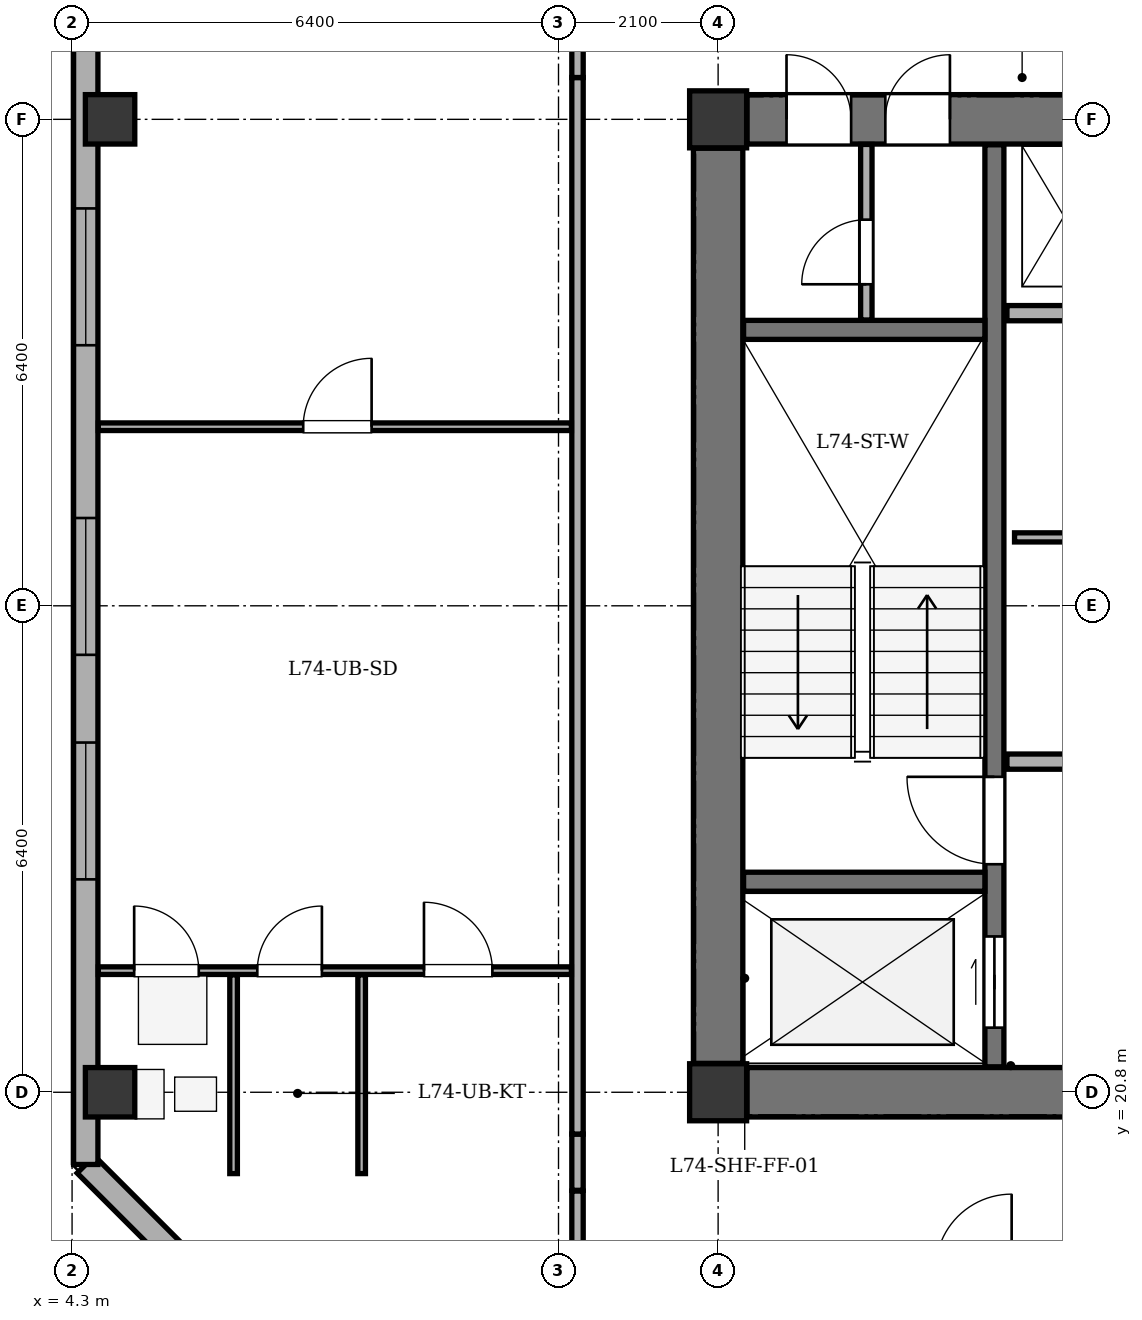
"""IFC4 building model, lengths in metres.
Left out: names, types, materials, properties, quantities, classifications, styles, units other than length and angle.
Written with IfcOpenShell. Run it as: python <this file> out.ifc"""

import sys

from ifc_helpers import new_model, si_unit, direction, frame, frame_2d, origin, origin_2d, place, context, subcontext, project, spatial, rectangle, extrude, element, fill, save


model = new_model("IFC4")
c1 = context("Model", 3, precision=1e-05, world=origin(), true_north=direction((0.0, 1.0)))
c2 = subcontext(c1, "Body", "Model", "MODEL_VIEW")
j1 = project(units=[si_unit("LENGTHUNIT", "METRE"), si_unit("PLANEANGLEUNIT", "RADIAN")], contexts=[c1])
p1 = place(None, origin())
s1 = spatial("IfcSite", under=j1, at=p1, CompositionType="ELEMENT")
p2 = place(p1, origin())
s2 = spatial("IfcBuilding", under=s1, at=p2, CompositionType="ELEMENT")
p3 = place(p2, frame((0.0, 0.0, 278.9)))
s3 = spatial("IfcBuildingStorey", under=s2, at=p3, CompositionType="ELEMENT", Elevation=278.9)
for number, where, z_axis, x_axis in (
    (1, (12.8, 20.8, 0.0), (0.0, 0.0, 1.0), (1.0, 0.0, 0.0)),
    (2, (12.8, 33.6, 0.0), (0.0, 0.0, 1.0), (1.0, 0.0, 0.0)),
):
    element("IfcColumn", number, at=place(p3, frame(where, z_axis=z_axis, x_axis=x_axis)), inside=s3, PredefinedType="COLUMN", context=c2, shape_type="SweptSolid", body=[
        extrude(rectangle(XDim=0.75, YDim=0.75, at=origin_2d()), origin(), (0.0, 0.0, 1.0), 3.4),
    ])
for number, where, z_axis, x_axis in (
    (3, (4.8, 20.8, 0.0), (0.0, 0.0, 1.0), (1.0, 0.0, 0.0)),
    (4, (4.8, 33.6, 0.0), (0.0, 0.0, 1.0), (1.0, 0.0, 0.0)),
):
    element("IfcColumn", number, at=place(p3, frame(where, z_axis=z_axis, x_axis=x_axis)), inside=s3, PredefinedType="COLUMN", context=c2, shape_type="SweptSolid", body=[
        extrude(rectangle(XDim=0.65, YDim=0.65, at=origin_2d()), origin(), (0.0, 0.0, 1.0), 3.4),
    ])
p4 = place(p3, frame((8.3, 16.03, 0.0), z_axis=(0.0, 0.0, 1.0), x_axis=(-0.707106781187, 0.707106781187, 0.0)))
e5 = element("IfcWall", 5, at=p4, inside=s3, PredefinedType="STANDARD", context=c2, shape_type="SweptSolid", body=[
    extrude(rectangle(XDim=5.402, YDim=0.32, at=frame_2d((2.701, 0.0))), origin(), (0.0, 0.0, 1.0), 2.575),
])
p5 = place(p4, frame((2.001, 0.0, 0.75)))
e6 = element("IfcOpeningElement", 6, at=p5, cuts=e5, PredefinedType="OPENING", context=c2, shape_type="SweptSolid", body=[
    extrude(rectangle(XDim=1.4, YDim=1.65, at=frame_2d((0.7, 0.825))), frame((0.0, 0.17, 0.0), z_axis=(0.0, -1.0, 0.0), x_axis=(1.0, 0.0, 0.0)), (0.0, 0.0, 1.0), 0.34),
])
p6 = place(p3, frame((4.48, 19.85, 0.0), z_axis=(0.0, 0.0, 1.0), x_axis=(0.0, 1.0, 0.0)))
e7 = element("IfcWall", 7, at=p6, inside=s3, PredefinedType="STANDARD", context=c2, shape_type="SweptSolid", body=[
    extrude(rectangle(XDim=21.25, YDim=0.32, at=frame_2d((10.625, 0.0))), origin(), (0.0, 0.0, 1.0), 2.575),
])
p7 = place(p6, frame((3.751, 0.0, 0.75)))
e8 = element("IfcOpeningElement", 8, at=p7, cuts=e7, PredefinedType="OPENING", context=c2, shape_type="SweptSolid", body=[
    extrude(rectangle(XDim=1.8, YDim=1.7, at=frame_2d((0.9, 0.85))), frame((0.0, 0.17, 0.0), z_axis=(0.0, -1.0, 0.0), x_axis=(1.0, 0.0, 0.0)), (0.0, 0.0, 1.0), 0.34),
])
p8 = place(p6, frame((6.705, 0.0, 0.75)))
e9 = element("IfcOpeningElement", 9, at=p8, cuts=e7, PredefinedType="OPENING", context=c2, shape_type="SweptSolid", body=[
    extrude(rectangle(XDim=1.8, YDim=1.7, at=frame_2d((0.9, 0.85))), frame((0.0, 0.17, 0.0), z_axis=(0.0, -1.0, 0.0), x_axis=(1.0, 0.0, 0.0)), (0.0, 0.0, 1.0), 0.34),
])
p9 = place(p6, frame((10.778, 0.0, 0.75)))
e10 = element("IfcOpeningElement", 10, at=p9, cuts=e7, PredefinedType="OPENING", context=c2, shape_type="SweptSolid", body=[
    extrude(rectangle(XDim=1.8, YDim=1.7, at=frame_2d((0.9, 0.85))), frame((0.0, 0.17, 0.0), z_axis=(0.0, -1.0, 0.0), x_axis=(1.0, 0.0, 0.0)), (0.0, 0.0, 1.0), 0.34),
])
p10 = place(p6, frame((15.062, 0.0, 0.75)))
e11 = element("IfcOpeningElement", 11, at=p10, cuts=e7, PredefinedType="OPENING", context=c2, shape_type="SweptSolid", body=[
    extrude(rectangle(XDim=1.8, YDim=1.7, at=frame_2d((0.9, 0.85))), frame((0.0, 0.17, 0.0), z_axis=(0.0, -1.0, 0.0), x_axis=(1.0, 0.0, 0.0)), (0.0, 0.0, 1.0), 0.34),
])
p11 = place(p6, frame((18.038, 0.0, 0.75)))
e12 = element("IfcOpeningElement", 12, at=p11, cuts=e7, PredefinedType="OPENING", context=c2, shape_type="SweptSolid", body=[
    extrude(rectangle(XDim=1.8, YDim=1.7, at=frame_2d((0.9, 0.85))), frame((0.0, 0.17, 0.0), z_axis=(0.0, -1.0, 0.0), x_axis=(1.0, 0.0, 0.0)), (0.0, 0.0, 1.0), 0.34),
])
p12 = place(p3, frame((12.8, 21.18, 0.0), z_axis=(0.0, 0.0, 1.0), x_axis=(0.0, 1.0, 0.0)))
e13 = element("IfcWall", 13, at=p12, inside=s3, PredefinedType="SHEAR", context=c2, shape_type="SweptSolid", body=[
    extrude(rectangle(XDim=12.04, YDim=0.65, at=frame_2d((6.02, 0.0))), origin(), (0.0, 0.0, 1.0), 2.95),
])
p13 = place(p3, frame((13.18, 20.8, 0.0), z_axis=(0.0, 0.0, 1.0), x_axis=(1.0, 0.0, 0.0)))
e14 = element("IfcWall", 14, at=p13, inside=s3, PredefinedType="SHEAR", context=c2, shape_type="SweptSolid", body=[
    extrude(rectangle(XDim=7.24, YDim=0.65, at=frame_2d((3.62, 0.0))), origin(), (0.0, 0.0, 1.0), 2.95),
])
p14 = place(p3, frame((13.18, 33.6, 0.0), z_axis=(0.0, 0.0, 1.0), x_axis=(1.0, 0.0, 0.0)))
e15 = element("IfcWall", 15, at=p14, inside=s3, PredefinedType="SHEAR", context=c2, shape_type="SweptSolid", body=[
    extrude(rectangle(XDim=7.24, YDim=0.65, at=frame_2d((3.62, 0.0))), origin(), (0.0, 0.0, 1.0), 2.95),
])
p15 = place(p14, frame((0.52, 0.0, 0.0)))
e16 = element("IfcOpeningElement", 16, at=p15, cuts=e15, PredefinedType="OPENING", context=c2, shape_type="SweptSolid", body=[
    extrude(rectangle(XDim=0.85, YDim=2.02, at=frame_2d((0.425, 1.01))), frame((0.0, 0.335, 0.0), z_axis=(0.0, -1.0, 0.0), x_axis=(1.0, 0.0, 0.0)), (0.0, 0.0, 1.0), 0.67),
])
p16 = place(p14, frame((1.82, 0.0, 0.0)))
e17 = element("IfcOpeningElement", 17, at=p16, cuts=e15, PredefinedType="OPENING", context=c2, shape_type="SweptSolid", body=[
    extrude(rectangle(XDim=0.85, YDim=2.02, at=frame_2d((0.425, 1.01))), frame((0.0, 0.335, 0.0), z_axis=(0.0, -1.0, 0.0), x_axis=(1.0, 0.0, 0.0)), (0.0, 0.0, 1.0), 0.67),
])
p17 = place(p3, frame((16.435, 21.135, 0.0), z_axis=(0.0, 0.0, 1.0), x_axis=(0.0, 1.0, 0.0)))
e18 = element("IfcWall", 18, at=p17, inside=s3, PredefinedType="SHEAR", context=c2, shape_type="SweptSolid", body=[
    extrude(rectangle(XDim=12.13, YDim=0.25, at=frame_2d((6.065, 0.0))), origin(), (0.0, 0.0, 1.0), 2.95),
])
p18 = place(p17, frame((0.515, 0.0, 0.0)))
e19 = element("IfcOpeningElement", 19, at=p18, cuts=e18, PredefinedType="OPENING", context=c2, shape_type="SweptSolid", body=[
    extrude(rectangle(XDim=1.2, YDim=2.15, at=frame_2d((0.6, 1.075))), frame((0.0, 0.135, 0.0), z_axis=(0.0, -1.0, 0.0), x_axis=(1.0, 0.0, 0.0)), (0.0, 0.0, 1.0), 0.27),
])
p19 = place(p17, frame((2.665, 0.0, 0.0)))
e20 = element("IfcOpeningElement", 20, at=p19, cuts=e18, PredefinedType="OPENING", context=c2, shape_type="SweptSolid", body=[
    extrude(rectangle(XDim=1.15, YDim=2.15, at=frame_2d((0.575, 1.075))), frame((0.0, 0.135, 0.0), z_axis=(0.0, -1.0, 0.0), x_axis=(1.0, 0.0, 0.0)), (0.0, 0.0, 1.0), 0.27),
])
for number, where, z_axis, x_axis in (
    (21, (13.135, 23.57, 0.0), (0.0, 0.0, 1.0), (1.0, 0.0, 0.0)),
    (22, (13.135, 30.83, 0.0), (0.0, 0.0, 1.0), (1.0, 0.0, 0.0)),
):
    element("IfcWall", number, at=place(p3, frame(where, z_axis=z_axis, x_axis=x_axis)), inside=s3, PredefinedType="SHEAR", context=c2, shape_type="SweptSolid", body=[
        extrude(rectangle(XDim=3.175, YDim=0.25, at=frame_2d((1.587, 0.0))), origin(), (0.0, 0.0, 1.0), 2.95),
    ])
for number, where, z_axis, x_axis in (
    (23, (16.6, 25.15, 0.0), (0.0, 0.0, 1.0), (1.0, 0.0, 0.0)),
    (24, (16.6, 31.05, 0.0), (0.0, 0.0, 1.0), (1.0, 0.0, 0.0)),
):
    element("IfcWall", number, at=place(p3, frame(where, z_axis=z_axis, x_axis=x_axis)), inside=s3, PredefinedType="SOLIDWALL", context=c2, shape_type="SweptSolid", body=[
        extrude(rectangle(XDim=3.85, YDim=0.2, at=frame_2d((1.925, 0.0))), origin(), (0.0, 0.0, 1.0), 2.95),
    ])
p20 = place(p3, frame((14.75, 30.96, 0.0), z_axis=(0.0, 0.0, 1.0), x_axis=(0.0, 1.0, 0.0)))
e25 = element("IfcWall", 25, at=p20, inside=s3, PredefinedType="PARTITIONING", context=c2, shape_type="SweptSolid", body=[
    extrude(rectangle(XDim=2.31, YDim=0.15, at=frame_2d((1.155, 0.0))), origin(), (0.0, 0.0, 1.0), 2.95),
])
p21 = place(p20, frame((0.47, 0.0, 0.0)))
e26 = element("IfcOpeningElement", 26, at=p21, cuts=e25, PredefinedType="OPENING", context=c2, shape_type="SweptSolid", body=[
    extrude(rectangle(XDim=0.85, YDim=2.02, at=frame_2d((0.425, 1.01))), frame((0.0, 0.085, 0.0), z_axis=(0.0, -1.0, 0.0), x_axis=(1.0, 0.0, 0.0)), (0.0, 0.0, 1.0), 0.17),
])
p22 = place(p3, frame((16.7, 28.1, 0.0), z_axis=(0.0, 0.0, 1.0), x_axis=(1.0, 0.0, 0.0)))
e27 = element("IfcWall", 27, at=p22, inside=s3, PredefinedType="PARTITIONING", context=c2, shape_type="SweptSolid", body=[
    extrude(rectangle(XDim=9.85, YDim=0.12, at=frame_2d((4.925, 0.0))), origin(), (0.0, 0.0, 1.0), 2.95),
])
p23 = place(p3, frame((10.95, 19.5, 0.0), z_axis=(0.0, 0.0, 1.0), x_axis=(0.0, -1.0, 0.0)))
e28 = element("IfcWall", 28, at=p23, inside=s3, PredefinedType="PARTITIONING", context=c2, shape_type="SweptSolid", body=[
    extrude(rectangle(XDim=0.96, YDim=0.15, at=frame_2d((0.48, 0.0))), origin(), (0.0, 0.0, 1.0), 2.95),
])
p24 = place(p3, frame((10.95, 19.51, 0.0), z_axis=(0.0, 0.0, 1.0), x_axis=(0.0, 1.0, 0.0)))
e29 = element("IfcWall", 29, at=p24, inside=s3, PredefinedType="PARTITIONING", context=c2, shape_type="SweptSolid", body=[
    extrude(rectangle(XDim=0.74, YDim=0.15, at=frame_2d((0.37, 0.0))), origin(), (0.0, 0.0, 1.0), 2.95),
])
p25 = place(p3, frame((10.95, 20.25, 0.0), z_axis=(0.0, 0.0, 1.0), x_axis=(0.0, 1.0, 0.0)))
e30 = element("IfcWall", 30, at=p25, inside=s3, PredefinedType="PARTITIONING", context=c2, shape_type="SweptSolid", body=[
    extrude(rectangle(XDim=13.9, YDim=0.15, at=frame_2d((6.95, 0.0))), origin(), (0.0, 0.0, 1.0), 2.95),
])
p26 = place(p3, frame((10.95, 34.15, 0.0), z_axis=(0.0, 0.0, 1.0), x_axis=(0.0, 1.0, 0.0)))
e31 = element("IfcWall", 31, at=p26, inside=s3, PredefinedType="PARTITIONING", context=c2, shape_type="SweptSolid", body=[
    extrude(rectangle(XDim=1.79, YDim=0.15, at=frame_2d((0.895, 0.0))), origin(), (0.0, 0.0, 1.0), 2.95),
])
p27 = place(p26, frame((0.58, 0.0, 0.0)))
e32 = element("IfcOpeningElement", 32, at=p27, cuts=e31, PredefinedType="OPENING", context=c2, shape_type="SweptSolid", body=[
    extrude(rectangle(XDim=1.0, YDim=2.1, at=frame_2d((0.5, 1.05))), frame((0.0, 0.085, 0.0), z_axis=(0.0, -1.0, 0.0), x_axis=(1.0, 0.0, 0.0)), (0.0, 0.0, 1.0), 0.17),
])
p28 = place(p3, frame((4.645, 22.4, 0.0), z_axis=(0.0, 0.0, 1.0), x_axis=(1.0, 0.0, 0.0)))
e33 = element("IfcWall", 33, at=p28, inside=s3, PredefinedType="PARTITIONING", context=c2, shape_type="SweptSolid", body=[
    extrude(rectangle(XDim=6.225, YDim=0.1, at=frame_2d((3.113, 0.0))), origin(), (0.0, 0.0, 1.0), 2.95),
])
p29 = place(p28, frame((0.472, 0.0, 0.0)))
e34 = element("IfcOpeningElement", 34, at=p29, cuts=e33, PredefinedType="OPENING", context=c2, shape_type="SweptSolid", body=[
    extrude(rectangle(XDim=0.85, YDim=2.05, at=frame_2d((0.425, 1.025))), frame((0.0, 0.06, 0.0), z_axis=(0.0, -1.0, 0.0), x_axis=(1.0, 0.0, 0.0)), (0.0, 0.0, 1.0), 0.12),
])
p30 = place(p28, frame((2.092, 0.0, 0.0)))
e35 = element("IfcOpeningElement", 35, at=p30, cuts=e33, PredefinedType="OPENING", context=c2, shape_type="SweptSolid", body=[
    extrude(rectangle(XDim=0.85, YDim=2.05, at=frame_2d((0.425, 1.025))), frame((0.0, 0.06, 0.0), z_axis=(0.0, -1.0, 0.0), x_axis=(1.0, 0.0, 0.0)), (0.0, 0.0, 1.0), 0.12),
])
p31 = place(p28, frame((4.285, 0.0, 0.0)))
e36 = element("IfcOpeningElement", 36, at=p31, cuts=e33, PredefinedType="OPENING", context=c2, shape_type="SweptSolid", body=[
    extrude(rectangle(XDim=0.9, YDim=2.05, at=frame_2d((0.45, 1.025))), frame((0.0, 0.06, 0.0), z_axis=(0.0, -1.0, 0.0), x_axis=(1.0, 0.0, 0.0)), (0.0, 0.0, 1.0), 0.12),
])
p32 = place(p3, frame((4.645, 29.556, 0.0), z_axis=(0.0, 0.0, 1.0), x_axis=(1.0, 0.0, 0.0)))
e37 = element("IfcWall", 37, at=p32, inside=s3, PredefinedType="PARTITIONING", context=c2, shape_type="SweptSolid", body=[
    extrude(rectangle(XDim=6.225, YDim=0.1, at=frame_2d((3.113, 0.0))), origin(), (0.0, 0.0, 1.0), 2.575),
])
p33 = place(p32, frame((2.696, 0.0, 0.0)))
e38 = element("IfcOpeningElement", 38, at=p33, cuts=e37, PredefinedType="OPENING", context=c2, shape_type="SweptSolid", body=[
    extrude(rectangle(XDim=0.9, YDim=2.05, at=frame_2d((0.45, 1.025))), frame((0.0, 0.06, 0.0), z_axis=(0.0, -1.0, 0.0), x_axis=(1.0, 0.0, 0.0)), (0.0, 0.0, 1.0), 0.12),
])
for number, where, z_axis, x_axis in (
    (39, (6.425, 19.73, 0.0), (0.0, 0.0, 1.0), (0.0, 1.0, 0.0)),
    (40, (8.11, 19.73, 0.0), (0.0, 0.0, 1.0), (0.0, 1.0, 0.0)),
):
    element("IfcWall", number, at=place(p3, frame(where, z_axis=z_axis, x_axis=x_axis)), inside=s3, PredefinedType="PARTITIONING", context=c2, shape_type="SweptSolid", body=[
        extrude(rectangle(XDim=2.615, YDim=0.1, at=frame_2d((1.308, 0.0))), origin(), (0.0, 0.0, 1.0), 2.95),
    ])
p34 = place(p7, origin())
e41 = element("IfcWindow", 41, at=p34, inside=s3, PartitioningType="SINGLE_PANEL", PredefinedType="WINDOW", context=c2, shape_type="SweptSolid", body=[
    extrude(rectangle(XDim=1.8, YDim=1.7, at=frame_2d((0.9, 0.85))), frame((0.0, -0.01, 0.0), z_axis=(0.0, -1.0, 0.0), x_axis=(1.0, 0.0, 0.0)), (0.0, 0.0, 1.0), 0.06),
])
fill(e8, e41)
p35 = place(p8, origin())
e42 = element("IfcWindow", 42, at=p35, inside=s3, PartitioningType="SINGLE_PANEL", PredefinedType="WINDOW", context=c2, shape_type="SweptSolid", body=[
    extrude(rectangle(XDim=1.8, YDim=1.7, at=frame_2d((0.9, 0.85))), frame((0.0, -0.01, 0.0), z_axis=(0.0, -1.0, 0.0), x_axis=(1.0, 0.0, 0.0)), (0.0, 0.0, 1.0), 0.06),
])
fill(e9, e42)
p36 = place(p9, origin())
e43 = element("IfcWindow", 43, at=p36, inside=s3, PartitioningType="SINGLE_PANEL", PredefinedType="WINDOW", context=c2, shape_type="SweptSolid", body=[
    extrude(rectangle(XDim=1.8, YDim=1.7, at=frame_2d((0.9, 0.85))), frame((0.0, -0.01, 0.0), z_axis=(0.0, -1.0, 0.0), x_axis=(1.0, 0.0, 0.0)), (0.0, 0.0, 1.0), 0.06),
])
fill(e10, e43)
p37 = place(p15, origin())
e44 = element("IfcDoor", 44, at=p37, inside=s3, OperationType="SINGLE_SWING_LEFT", PredefinedType="DOOR", context=c2, shape_type="SweptSolid", body=[
    extrude(rectangle(XDim=0.85, YDim=2.02, at=frame_2d((0.425, 1.01))), frame((0.0, 0.025, 0.0), z_axis=(0.0, -1.0, 0.0), x_axis=(1.0, 0.0, 0.0)), (0.0, 0.0, 1.0), 0.05),
])
fill(e16, e44)
p38 = place(p16, origin())
e45 = element("IfcDoor", 45, at=p38, inside=s3, OperationType="SINGLE_SWING_RIGHT", PredefinedType="DOOR", context=c2, shape_type="SweptSolid", body=[
    extrude(rectangle(XDim=0.85, YDim=2.02, at=frame_2d((0.425, 1.01))), frame((0.0, 0.025, 0.0), z_axis=(0.0, -1.0, 0.0), x_axis=(1.0, 0.0, 0.0)), (0.0, 0.0, 1.0), 0.05),
])
fill(e17, e45)
p39 = place(p18, origin())
e46 = element("IfcDoor", 46, at=p39, inside=s3, OperationType="DOUBLE_DOOR_SLIDING", PredefinedType="DOOR", context=c2, shape_type="SweptSolid", body=[
    extrude(rectangle(XDim=1.2, YDim=2.15, at=frame_2d((0.6, 1.075))), frame((0.0, 0.025, 0.0), z_axis=(0.0, -1.0, 0.0), x_axis=(1.0, 0.0, 0.0)), (0.0, 0.0, 1.0), 0.05),
])
fill(e19, e46)
p40 = place(p19, origin())
e47 = element("IfcDoor", 47, at=p40, inside=s3, OperationType="SINGLE_SWING_RIGHT", PredefinedType="DOOR", context=c2, shape_type="SweptSolid", body=[
    extrude(rectangle(XDim=1.15, YDim=2.15, at=frame_2d((0.575, 1.075))), frame((0.0, 0.025, 0.0), z_axis=(0.0, -1.0, 0.0), x_axis=(1.0, 0.0, 0.0)), (0.0, 0.0, 1.0), 0.05),
])
fill(e20, e47)
p41 = place(p21, origin())
e48 = element("IfcDoor", 48, at=p41, inside=s3, OperationType="SINGLE_SWING_LEFT", PredefinedType="DOOR", context=c2, shape_type="SweptSolid", body=[
    extrude(rectangle(XDim=0.85, YDim=2.02, at=frame_2d((0.425, 1.01))), frame((0.0, 0.025, 0.0), z_axis=(0.0, -1.0, 0.0), x_axis=(1.0, 0.0, 0.0)), (0.0, 0.0, 1.0), 0.05),
])
fill(e26, e48)
p42 = place(p33, origin())
e49 = element("IfcDoor", 49, at=p42, inside=s3, OperationType="SINGLE_SWING_RIGHT", PredefinedType="DOOR", context=c2, shape_type="SweptSolid", body=[
    extrude(rectangle(XDim=0.9, YDim=2.05, at=frame_2d((0.45, 1.025))), frame((0.0, 0.025, 0.0), z_axis=(0.0, -1.0, 0.0), x_axis=(1.0, 0.0, 0.0)), (0.0, 0.0, 1.0), 0.05),
])
fill(e38, e49)
p43 = place(p29, origin())
e50 = element("IfcDoor", 50, at=p43, inside=s3, OperationType="SINGLE_SWING_LEFT", PredefinedType="DOOR", context=c2, shape_type="SweptSolid", body=[
    extrude(rectangle(XDim=0.85, YDim=2.05, at=frame_2d((0.425, 1.025))), frame((0.0, 0.025, 0.0), z_axis=(0.0, -1.0, 0.0), x_axis=(1.0, 0.0, 0.0)), (0.0, 0.0, 1.0), 0.05),
])
fill(e34, e50)
p44 = place(p30, origin())
e51 = element("IfcDoor", 51, at=p44, inside=s3, OperationType="SINGLE_SWING_RIGHT", PredefinedType="DOOR", context=c2, shape_type="SweptSolid", body=[
    extrude(rectangle(XDim=0.85, YDim=2.05, at=frame_2d((0.425, 1.025))), frame((0.0, 0.025, 0.0), z_axis=(0.0, -1.0, 0.0), x_axis=(1.0, 0.0, 0.0)), (0.0, 0.0, 1.0), 0.05),
])
fill(e35, e51)
p45 = place(p31, origin())
e52 = element("IfcDoor", 52, at=p45, inside=s3, OperationType="SINGLE_SWING_LEFT", PredefinedType="DOOR", context=c2, shape_type="SweptSolid", body=[
    extrude(rectangle(XDim=0.9, YDim=2.05, at=frame_2d((0.45, 1.025))), frame((0.0, 0.025, 0.0), z_axis=(0.0, -1.0, 0.0), x_axis=(1.0, 0.0, 0.0)), (0.0, 0.0, 1.0), 0.05),
])
fill(e36, e52)
save(model, sys.argv[1])
